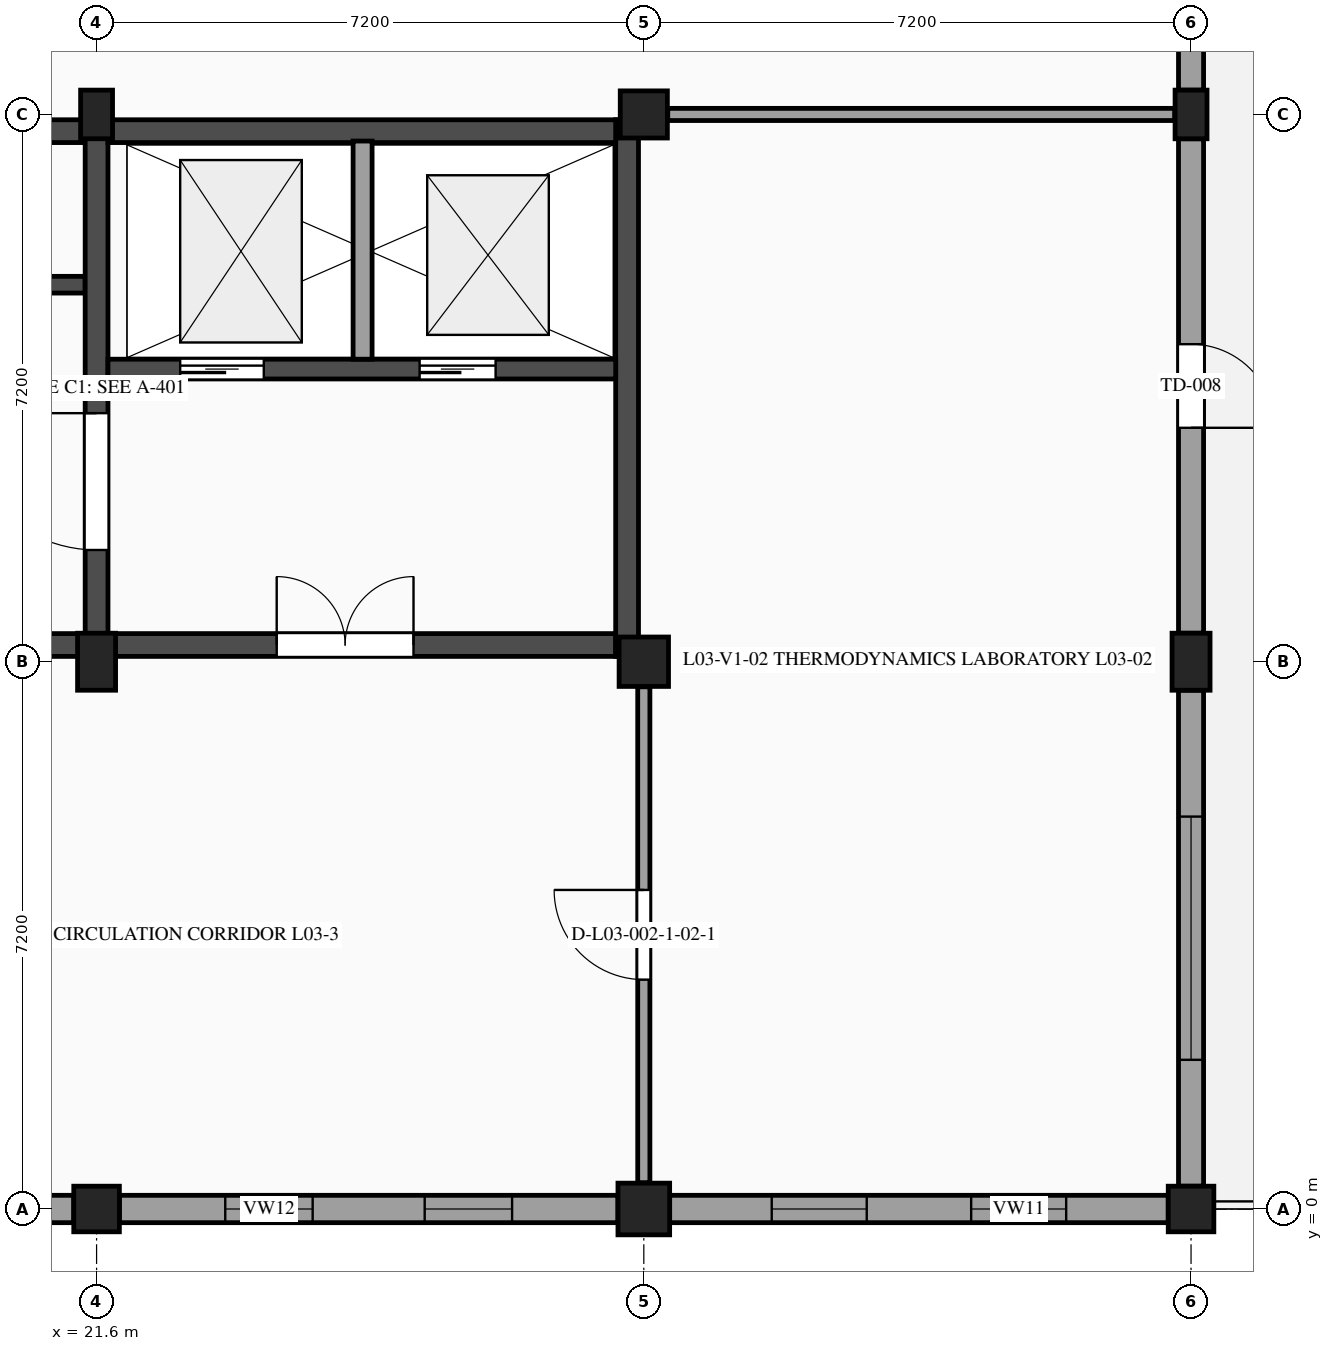
"""IFC4 building model, lengths in metres.
Left out: names, types, materials, properties, quantities, classifications, styles, units other than length and angle.
Written with IfcOpenShell. Run it as: python <this file> out.ifc"""

import sys

from ifc_helpers import new_model, si_unit, direction, frame, frame_2d, origin, origin_2d, place, context, subcontext, project, spatial, rectangle, extrude, element, fill, save


model = new_model("IFC4")
c1 = context("Model", 3, precision=1e-05, world=origin(), true_north=direction((0.0, 1.0)))
c2 = subcontext(c1, "Body", "Model", "MODEL_VIEW")
j1 = project(units=[si_unit("LENGTHUNIT", "METRE"), si_unit("PLANEANGLEUNIT", "RADIAN")], contexts=[c1])
p1 = place(None, origin())
s1 = spatial("IfcSite", under=j1, at=p1, CompositionType="ELEMENT")
p2 = place(p1, origin())
s2 = spatial("IfcBuilding", under=s1, at=p2, CompositionType="ELEMENT")
p3 = place(p2, frame((0.0, 0.0, 14.4)))
s3 = spatial("IfcBuildingStorey", under=s2, at=p3, CompositionType="ELEMENT", Elevation=14.4)
p4 = place(p3, frame((21.6, 0.0, 0.0), z_axis=(0.0, 0.0, 1.0), x_axis=(1.0, 0.0, 0.0)))
e1 = element("IfcColumn", 1, at=p4, inside=s3, PredefinedType="COLUMN", context=c2, shape_type="SweptSolid", body=[
    extrude(rectangle(XDim=0.6, YDim=0.6, at=origin_2d()), origin(), (0.0, 0.0, 1.0), 4.2),
])
p5 = place(p3, frame((21.6, 7.2, 0.0), z_axis=(0.0, 0.0, 1.0), x_axis=(1.0, 0.0, 0.0)))
e2 = element("IfcColumn", 2, at=p5, inside=s3, PredefinedType="COLUMN", context=c2, shape_type="SweptSolid", body=[
    extrude(rectangle(XDim=0.5, YDim=0.75, at=origin_2d()), origin(), (0.0, 0.0, 1.0), 4.2),
])
p6 = place(p3, frame((21.6, 14.4, 0.0), z_axis=(0.0, 0.0, 1.0), x_axis=(1.0, 0.0, 0.0)))
e3 = element("IfcColumn", 3, at=p6, inside=s3, PredefinedType="PILASTER", context=c2, shape_type="SweptSolid", body=[
    extrude(rectangle(XDim=0.42, YDim=0.64, at=origin_2d()), origin(), (0.0, 0.0, 1.0), 4.2),
])
p7 = place(p3, frame((28.8, 0.0, 0.0), z_axis=(0.0, 0.0, 1.0), x_axis=(1.0, 0.0, 0.0)))
e4 = element("IfcColumn", 4, at=p7, inside=s3, PredefinedType="COLUMN", context=c2, shape_type="SweptSolid", body=[
    extrude(rectangle(XDim=0.68, YDim=0.68, at=origin_2d()), origin(), (0.0, 0.0, 1.0), 4.2),
])
p8 = place(p3, frame((28.8, 7.2, 0.0), z_axis=(0.0, 0.0, 1.0), x_axis=(1.0, 0.0, 0.0)))
e5 = element("IfcColumn", 5, at=p8, inside=s3, PredefinedType="COLUMN", context=c2, shape_type="SweptSolid", body=[
    extrude(rectangle(XDim=0.65, YDim=0.65, at=origin_2d()), origin(), (0.0, 0.0, 1.0), 4.2),
])
p9 = place(p3, frame((28.8, 14.4, 0.0), z_axis=(0.0, 0.0, 1.0), x_axis=(1.0, 0.0, 0.0)))
e6 = element("IfcColumn", 6, at=p9, inside=s3, PredefinedType="COLUMN", context=c2, shape_type="SweptSolid", body=[
    extrude(rectangle(XDim=0.62, YDim=0.62, at=origin_2d()), origin(), (0.0, 0.0, 1.0), 4.2),
])
p10 = place(p3, frame((36.0, 0.0, 0.0), z_axis=(0.0, 0.0, 1.0), x_axis=(1.0, 0.0, 0.0)))
e7 = element("IfcColumn", 7, at=p10, inside=s3, PredefinedType="COLUMN", context=c2, shape_type="SweptSolid", body=[
    extrude(rectangle(XDim=0.6, YDim=0.6, at=origin_2d()), origin(), (0.0, 0.0, 1.0), 4.2),
])
p11 = place(p3, frame((36.0, 7.2, 0.0), z_axis=(0.0, 0.0, 1.0), x_axis=(1.0, 0.0, 0.0)))
e8 = element("IfcColumn", 8, at=p11, inside=s3, PredefinedType="COLUMN", context=c2, shape_type="SweptSolid", body=[
    extrude(rectangle(XDim=0.5, YDim=0.75, at=origin_2d()), origin(), (0.0, 0.0, 1.0), 4.2),
])
p12 = place(p3, frame((36.0, 14.4, 0.0), z_axis=(0.0, 0.0, 1.0), x_axis=(1.0, 0.0, 0.0)))
e9 = element("IfcColumn", 9, at=p12, inside=s3, PredefinedType="PILASTER", context=c2, shape_type="SweptSolid", body=[
    extrude(rectangle(XDim=0.42, YDim=0.64, at=origin_2d()), origin(), (0.0, 0.0, 1.0), 4.2),
])
p13 = place(p3, frame((36.0, 21.26, 0.0), z_axis=(0.0, 0.0, 1.0), x_axis=(0.0, -1.0, 0.0)))
e10 = element("IfcWall", 10, at=p13, inside=s3, PredefinedType="STANDARD", context=c2, shape_type="SweptSolid", body=[
    extrude(rectangle(XDim=6.54, YDim=0.33, at=frame_2d((3.27, 0.0))), origin(), (0.0, 0.0, 1.0), 3.135),
])
p14 = place(p13, frame((2.57, 0.0, 0.0)))
e11 = element("IfcOpeningElement", 11, at=p14, cuts=e10, PredefinedType="OPENING", context=c2, shape_type="SweptSolid", body=[
    extrude(rectangle(XDim=1.4, YDim=2.25, at=frame_2d((0.7, 1.125))), frame((0.0, 0.175, 0.0), z_axis=(0.0, -1.0, 0.0), x_axis=(1.0, 0.0, 0.0)), (0.0, 0.0, 1.0), 0.35),
])
p15 = place(p3, frame((36.0, 14.08, 0.0), z_axis=(0.0, 0.0, 1.0), x_axis=(0.0, -1.0, 0.0)))
e12 = element("IfcWall", 12, at=p15, inside=s3, PredefinedType="STANDARD", context=c2, shape_type="SweptSolid", body=[
    extrude(rectangle(XDim=6.505, YDim=0.33, at=frame_2d((3.252, 0.0))), origin(), (0.0, 0.0, 1.0), 3.135),
])
p16 = place(p15, frame((2.702, 0.0, 0.0)))
e13 = element("IfcOpeningElement", 13, at=p16, cuts=e12, PredefinedType="OPENING", context=c2, shape_type="SweptSolid", body=[
    extrude(rectangle(XDim=1.1, YDim=2.2, at=frame_2d((0.55, 1.1))), frame((0.0, 0.175, 0.0), z_axis=(0.0, -1.0, 0.0), x_axis=(1.0, 0.0, 0.0)), (0.0, 0.0, 1.0), 0.35),
])
p17 = place(p3, frame((36.0, 6.825, 0.0), z_axis=(0.0, 0.0, 1.0), x_axis=(0.0, -1.0, 0.0)))
e14 = element("IfcWall", 14, at=p17, inside=s3, PredefinedType="STANDARD", context=c2, shape_type="SweptSolid", body=[
    extrude(rectangle(XDim=6.525, YDim=0.33, at=frame_2d((3.262, 0.0))), origin(), (0.0, 0.0, 1.0), 3.135),
])
p18 = place(p17, frame((1.663, 0.0, 0.95)))
e15 = element("IfcOpeningElement", 15, at=p18, cuts=e14, PredefinedType="OPENING", context=c2, shape_type="SweptSolid", body=[
    extrude(rectangle(XDim=3.2, YDim=1.45, at=frame_2d((1.6, 0.725))), frame((0.0, 0.175, 0.0), z_axis=(0.0, -1.0, 0.0), x_axis=(1.0, 0.0, 0.0)), (0.0, 0.0, 1.0), 0.35),
])
p19 = place(p3, frame((35.7, 0.0, 0.0), z_axis=(0.0, 0.0, 1.0), x_axis=(-1.0, 0.0, 0.0)))
e16 = element("IfcWall", 16, at=p19, inside=s3, PredefinedType="STANDARD", context=c2, shape_type="SweptSolid", body=[
    extrude(rectangle(XDim=6.56, YDim=0.36, at=frame_2d((3.28, 0.0))), origin(), (0.0, 0.0, 1.0), 3.185),
])
p20 = place(p19, frame((1.343, 0.0, 1.15)))
e17 = element("IfcOpeningElement", 17, at=p20, cuts=e16, PredefinedType="OPENING", context=c2, shape_type="SweptSolid", body=[
    extrude(rectangle(XDim=1.25, YDim=1.25, at=frame_2d((0.625, 0.625))), frame((0.0, 0.19, 0.0), z_axis=(0.0, -1.0, 0.0), x_axis=(1.0, 0.0, 0.0)), (0.0, 0.0, 1.0), 0.38),
])
p21 = place(p19, frame((3.967, 0.0, 1.15)))
e18 = element("IfcOpeningElement", 18, at=p21, cuts=e16, PredefinedType="OPENING", context=c2, shape_type="SweptSolid", body=[
    extrude(rectangle(XDim=1.25, YDim=1.25, at=frame_2d((0.625, 0.625))), frame((0.0, 0.19, 0.0), z_axis=(0.0, -1.0, 0.0), x_axis=(1.0, 0.0, 0.0)), (0.0, 0.0, 1.0), 0.38),
])
p22 = place(p3, frame((28.46, 0.0, 0.0), z_axis=(0.0, 0.0, 1.0), x_axis=(-1.0, 0.0, 0.0)))
e19 = element("IfcWall", 19, at=p22, inside=s3, PredefinedType="STANDARD", context=c2, shape_type="SweptSolid", body=[
    extrude(rectangle(XDim=6.56, YDim=0.36, at=frame_2d((3.28, 0.0))), origin(), (0.0, 0.0, 1.0), 3.185),
])
p23 = place(p22, frame((1.393, 0.0, 1.15)))
e20 = element("IfcOpeningElement", 20, at=p23, cuts=e19, PredefinedType="OPENING", context=c2, shape_type="SweptSolid", body=[
    extrude(rectangle(XDim=1.15, YDim=1.2, at=frame_2d((0.575, 0.6))), frame((0.0, 0.19, 0.0), z_axis=(0.0, -1.0, 0.0), x_axis=(1.0, 0.0, 0.0)), (0.0, 0.0, 1.0), 0.38),
])
p24 = place(p22, frame((4.017, 0.0, 1.15)))
e21 = element("IfcOpeningElement", 21, at=p24, cuts=e19, PredefinedType="OPENING", context=c2, shape_type="SweptSolid", body=[
    extrude(rectangle(XDim=1.15, YDim=1.2, at=frame_2d((0.575, 0.6))), frame((0.0, 0.19, 0.0), z_axis=(0.0, -1.0, 0.0), x_axis=(1.0, 0.0, 0.0)), (0.0, 0.0, 1.0), 0.38),
])
p25 = place(p3, frame((21.3, 0.0, 0.0), z_axis=(0.0, 0.0, 1.0), x_axis=(-1.0, 0.0, 0.0)))
e22 = element("IfcWall", 22, at=p25, inside=s3, PredefinedType="STANDARD", context=c2, shape_type="SweptSolid", body=[
    extrude(rectangle(XDim=6.56, YDim=0.36, at=frame_2d((3.28, 0.0))), origin(), (0.0, 0.0, 1.0), 3.185),
])
p26 = place(p25, frame((1.468, 0.0, 1.15)))
e23 = element("IfcOpeningElement", 23, at=p26, cuts=e22, PredefinedType="OPENING", context=c2, shape_type="SweptSolid", body=[
    extrude(rectangle(XDim=1.0, YDim=1.2, at=frame_2d((0.5, 0.6))), frame((0.0, 0.19, 0.0), z_axis=(0.0, -1.0, 0.0), x_axis=(1.0, 0.0, 0.0)), (0.0, 0.0, 1.0), 0.38),
])
p27 = place(p25, frame((4.092, 0.0, 1.15)))
e24 = element("IfcOpeningElement", 24, at=p27, cuts=e22, PredefinedType="OPENING", context=c2, shape_type="SweptSolid", body=[
    extrude(rectangle(XDim=1.0, YDim=1.2, at=frame_2d((0.5, 0.6))), frame((0.0, 0.19, 0.0), z_axis=(0.0, -1.0, 0.0), x_axis=(1.0, 0.0, 0.0)), (0.0, 0.0, 1.0), 0.38),
])
p28 = place(p3, frame((14.77, 7.42, 0.0), z_axis=(0.0, 0.0, 1.0), x_axis=(1.0, 0.0, 0.0)))
e25 = element("IfcWall", 25, at=p28, inside=s3, PredefinedType="SHEAR", context=c2, shape_type="SweptSolid", body=[
    extrude(rectangle(XDim=6.68, YDim=0.3, at=frame_2d((3.34, 0.0))), origin(), (0.0, 0.0, 1.0), 3.94),
])
p29 = place(p3, frame((14.77, 14.18, 0.0), z_axis=(0.0, 0.0, 1.0), x_axis=(1.0, 0.0, 0.0)))
e26 = element("IfcWall", 26, at=p29, inside=s3, PredefinedType="SHEAR", context=c2, shape_type="SweptSolid", body=[
    extrude(rectangle(XDim=6.68, YDim=0.3, at=frame_2d((3.34, 0.0))), origin(), (0.0, 0.0, 1.0), 3.94),
])
p30 = place(p29, frame((1.42, 0.0, 0.0)))
e27 = element("IfcOpeningElement", 27, at=p30, cuts=e26, PredefinedType="OPENING", context=c2, shape_type="SweptSolid", body=[
    extrude(rectangle(XDim=0.85, YDim=2.1, at=frame_2d((0.425, 1.05))), frame((0.0, 0.16, 0.0), z_axis=(0.0, -1.0, 0.0), x_axis=(1.0, 0.0, 0.0)), (0.0, 0.0, 1.0), 0.32),
])
p31 = place(p29, frame((3.4, 0.0, 0.0)))
e28 = element("IfcOpeningElement", 28, at=p31, cuts=e26, PredefinedType="OPENING", context=c2, shape_type="SweptSolid", body=[
    extrude(rectangle(XDim=0.95, YDim=2.15, at=frame_2d((0.475, 1.075))), frame((0.0, 0.16, 0.0), z_axis=(0.0, -1.0, 0.0), x_axis=(1.0, 0.0, 0.0)), (0.0, 0.0, 1.0), 0.32),
])
p32 = place(p3, frame((14.77, 12.16, 0.0), z_axis=(0.0, 0.0, 1.0), x_axis=(1.0, 0.0, 0.0)))
e29 = element("IfcWall", 29, at=p32, inside=s3, PredefinedType="SHEAR", context=c2, shape_type="SweptSolid", body=[
    extrude(rectangle(XDim=6.68, YDim=0.22, at=frame_2d((3.34, 0.0))), origin(), (0.0, 0.0, 1.0), 3.94),
])
p33 = place(p3, frame((21.6, 7.27, 0.0), z_axis=(0.0, 0.0, 1.0), x_axis=(0.0, 1.0, 0.0)))
e30 = element("IfcWall", 30, at=p33, inside=s3, PredefinedType="SHEAR", context=c2, shape_type="SweptSolid", body=[
    extrude(rectangle(XDim=7.06, YDim=0.3, at=frame_2d((3.53, 0.0))), origin(), (0.0, 0.0, 1.0), 3.94),
])
p34 = place(p33, frame((1.4, 0.0, 0.0)))
e31 = element("IfcOpeningElement", 31, at=p34, cuts=e30, PredefinedType="OPENING", context=c2, shape_type="SweptSolid", body=[
    extrude(rectangle(XDim=1.8, YDim=2.2, at=frame_2d((0.9, 1.1))), frame((0.0, 0.16, 0.0), z_axis=(0.0, -1.0, 0.0), x_axis=(1.0, 0.0, 0.0)), (0.0, 0.0, 1.0), 0.32),
])
p35 = place(p3, frame((21.75, 7.42, 0.0), z_axis=(0.0, 0.0, 1.0), x_axis=(1.0, 0.0, 0.0)))
e32 = element("IfcWall", 32, at=p35, inside=s3, PredefinedType="SHEAR", context=c2, shape_type="SweptSolid", body=[
    extrude(rectangle(XDim=6.68, YDim=0.3, at=frame_2d((3.34, 0.0))), origin(), (0.0, 0.0, 1.0), 3.94),
])
p36 = place(p35, frame((2.22, 0.0, 0.0)))
e33 = element("IfcOpeningElement", 33, at=p36, cuts=e32, PredefinedType="OPENING", context=c2, shape_type="SweptSolid", body=[
    extrude(rectangle(XDim=1.8, YDim=2.2, at=frame_2d((0.9, 1.1))), frame((0.0, 0.16, 0.0), z_axis=(0.0, -1.0, 0.0), x_axis=(1.0, 0.0, 0.0)), (0.0, 0.0, 1.0), 0.32),
])
p37 = place(p3, frame((28.58, 7.27, 0.0), z_axis=(0.0, 0.0, 1.0), x_axis=(0.0, 1.0, 0.0)))
e34 = element("IfcWall", 34, at=p37, inside=s3, PredefinedType="SHEAR", context=c2, shape_type="SweptSolid", body=[
    extrude(rectangle(XDim=7.06, YDim=0.3, at=frame_2d((3.53, 0.0))), origin(), (0.0, 0.0, 1.0), 3.94),
])
p38 = place(p3, frame((21.75, 14.18, 0.0), z_axis=(0.0, 0.0, 1.0), x_axis=(1.0, 0.0, 0.0)))
e35 = element("IfcWall", 35, at=p38, inside=s3, PredefinedType="SHEAR", context=c2, shape_type="SweptSolid", body=[
    extrude(rectangle(XDim=6.68, YDim=0.3, at=frame_2d((3.34, 0.0))), origin(), (0.0, 0.0, 1.0), 3.94),
])
p39 = place(p3, frame((21.75, 11.05, 0.0), z_axis=(0.0, 0.0, 1.0), x_axis=(1.0, 0.0, 0.0)))
e36 = element("IfcWall", 36, at=p39, inside=s3, PredefinedType="SHEAR", context=c2, shape_type="SweptSolid", body=[
    extrude(rectangle(XDim=6.68, YDim=0.26, at=frame_2d((3.34, 0.0))), origin(), (0.0, 0.0, 1.0), 3.94),
])
p40 = place(p39, frame((0.95, 0.0, 0.0)))
e37 = element("IfcOpeningElement", 37, at=p40, cuts=e36, PredefinedType="OPENING", context=c2, shape_type="SweptSolid", body=[
    extrude(rectangle(XDim=1.1, YDim=2.2, at=frame_2d((0.55, 1.1))), frame((0.0, 0.14, 0.0), z_axis=(0.0, -1.0, 0.0), x_axis=(1.0, 0.0, 0.0)), (0.0, 0.0, 1.0), 0.28),
])
p41 = place(p39, frame((4.1, 0.0, 0.0)))
e38 = element("IfcOpeningElement", 38, at=p41, cuts=e36, PredefinedType="OPENING", context=c2, shape_type="SweptSolid", body=[
    extrude(rectangle(XDim=1.0, YDim=2.15, at=frame_2d((0.5, 1.075))), frame((0.0, 0.14, 0.0), z_axis=(0.0, -1.0, 0.0), x_axis=(1.0, 0.0, 0.0)), (0.0, 0.0, 1.0), 0.28),
])
p42 = place(p3, frame((25.1, 11.18, 0.0), z_axis=(0.0, 0.0, 1.0), x_axis=(0.0, 1.0, 0.0)))
e39 = element("IfcWall", 39, at=p42, inside=s3, PredefinedType="PARTITIONING", context=c2, shape_type="SweptSolid", body=[
    extrude(rectangle(XDim=2.87, YDim=0.25, at=frame_2d((1.435, 0.0))), origin(), (0.0, 0.0, 1.0), 3.94),
])
p43 = place(p3, frame((28.8, 0.345, 0.0), z_axis=(0.0, 0.0, 1.0), x_axis=(0.0, 1.0, 0.0)))
e40 = element("IfcWall", 40, at=p43, inside=s3, PredefinedType="PARTITIONING", context=c2, shape_type="SweptSolid", body=[
    extrude(rectangle(XDim=6.525, YDim=0.16, at=frame_2d((3.263, 0.0))), origin(), (0.0, 0.0, 1.0), 3.25),
])
p44 = place(p43, frame((2.673, 0.0, 0.0)))
e41 = element("IfcOpeningElement", 41, at=p44, cuts=e40, PredefinedType="OPENING", context=c2, shape_type="SweptSolid", body=[
    extrude(rectangle(XDim=1.18, YDim=2.18, at=frame_2d((0.59, 1.09))), frame((0.0, 0.09, 0.0), z_axis=(0.0, -1.0, 0.0), x_axis=(1.0, 0.0, 0.0)), (0.0, 0.0, 1.0), 0.18),
])
p45 = place(p3, frame((29.115, 14.4, 0.0), z_axis=(0.0, 0.0, 1.0), x_axis=(1.0, 0.0, 0.0)))
e42 = element("IfcWall", 42, at=p45, inside=s3, PredefinedType="PARTITIONING", context=c2, shape_type="SweptSolid", body=[
    extrude(rectangle(XDim=6.67, YDim=0.16, at=frame_2d((3.335, 0.0))), origin(), (0.0, 0.0, 1.0), 3.29),
])
p46 = place(p16, origin())
e43 = element("IfcDoor", 43, at=p46, inside=s3, OperationType="SINGLE_SWING_RIGHT", PredefinedType="DOOR", context=c2, shape_type="SweptSolid", body=[
    extrude(rectangle(XDim=1.1, YDim=2.2, at=frame_2d((0.55, 1.1))), frame((0.0, 0.025, 0.0), z_axis=(0.0, -1.0, 0.0), x_axis=(1.0, 0.0, 0.0)), (0.0, 0.0, 1.0), 0.05),
])
fill(e13, e43)
p47 = place(p18, origin())
e44 = element("IfcWindow", 44, at=p47, inside=s3, PartitioningType="SINGLE_PANEL", PredefinedType="WINDOW", context=c2, shape_type="SweptSolid", body=[
    extrude(rectangle(XDim=3.2, YDim=1.45, at=frame_2d((1.6, 0.725))), frame((0.0, 0.03, 0.0), z_axis=(0.0, -1.0, 0.0), x_axis=(1.0, 0.0, 0.0)), (0.0, 0.0, 1.0), 0.06),
])
fill(e15, e44)
p48 = place(p20, origin())
e45 = element("IfcWindow", 45, at=p48, inside=s3, PartitioningType="SINGLE_PANEL", PredefinedType="WINDOW", context=c2, shape_type="SweptSolid", body=[
    extrude(rectangle(XDim=1.25, YDim=1.25, at=frame_2d((0.625, 0.625))), frame((0.0, -0.08, 0.0), z_axis=(0.0, -1.0, 0.0), x_axis=(1.0, 0.0, 0.0)), (0.0, 0.0, 1.0), 0.06),
])
fill(e17, e45)
p49 = place(p21, origin())
e46 = element("IfcWindow", 46, at=p49, inside=s3, PartitioningType="SINGLE_PANEL", PredefinedType="WINDOW", context=c2, shape_type="SweptSolid", body=[
    extrude(rectangle(XDim=1.25, YDim=1.25, at=frame_2d((0.625, 0.625))), frame((0.0, -0.08, 0.0), z_axis=(0.0, -1.0, 0.0), x_axis=(1.0, 0.0, 0.0)), (0.0, 0.0, 1.0), 0.06),
])
fill(e18, e46)
p50 = place(p23, origin())
e47 = element("IfcWindow", 47, at=p50, inside=s3, PartitioningType="SINGLE_PANEL", PredefinedType="WINDOW", context=c2, shape_type="SweptSolid", body=[
    extrude(rectangle(XDim=1.15, YDim=1.2, at=frame_2d((0.575, 0.6))), frame((0.0, -0.08, 0.0), z_axis=(0.0, -1.0, 0.0), x_axis=(1.0, 0.0, 0.0)), (0.0, 0.0, 1.0), 0.06),
])
fill(e20, e47)
p51 = place(p24, origin())
e48 = element("IfcWindow", 48, at=p51, inside=s3, PartitioningType="SINGLE_PANEL", PredefinedType="WINDOW", context=c2, shape_type="SweptSolid", body=[
    extrude(rectangle(XDim=1.15, YDim=1.2, at=frame_2d((0.575, 0.6))), frame((0.0, -0.08, 0.0), z_axis=(0.0, -1.0, 0.0), x_axis=(1.0, 0.0, 0.0)), (0.0, 0.0, 1.0), 0.06),
])
fill(e21, e48)
p52 = place(p34, origin())
e49 = element("IfcDoor", 49, at=p52, inside=s3, OperationType="SINGLE_SWING_RIGHT", PredefinedType="DOOR", context=c2, shape_type="SweptSolid", body=[
    extrude(rectangle(XDim=1.8, YDim=2.2, at=frame_2d((0.9, 1.1))), frame((0.0, 0.025, 0.0), z_axis=(0.0, -1.0, 0.0), x_axis=(1.0, 0.0, 0.0)), (0.0, 0.0, 1.0), 0.05),
])
fill(e31, e49)
p53 = place(p40, origin())
e50 = element("IfcDoor", 50, at=p53, inside=s3, OperationType="SLIDING_TO_LEFT", PredefinedType="DOOR", context=c2, shape_type="SweptSolid", body=[
    extrude(rectangle(XDim=1.1, YDim=2.2, at=frame_2d((0.55, 1.1))), frame((0.0, 0.025, 0.0), z_axis=(0.0, -1.0, 0.0), x_axis=(1.0, 0.0, 0.0)), (0.0, 0.0, 1.0), 0.05),
])
fill(e37, e50)
p54 = place(p41, origin())
e51 = element("IfcDoor", 51, at=p54, inside=s3, OperationType="SLIDING_TO_RIGHT", PredefinedType="DOOR", context=c2, shape_type="SweptSolid", body=[
    extrude(rectangle(XDim=1.0, YDim=2.15, at=frame_2d((0.5, 1.075))), frame((0.0, 0.025, 0.0), z_axis=(0.0, -1.0, 0.0), x_axis=(1.0, 0.0, 0.0)), (0.0, 0.0, 1.0), 0.05),
])
fill(e38, e51)
p55 = place(p36, origin())
e52 = element("IfcDoor", 52, at=p55, inside=s3, OperationType="DOUBLE_DOOR_SINGLE_SWING", PredefinedType="DOOR", context=c2, shape_type="SweptSolid", body=[
    extrude(rectangle(XDim=1.8, YDim=2.2, at=frame_2d((0.9, 1.1))), frame((0.0, 0.025, 0.0), z_axis=(0.0, -1.0, 0.0), x_axis=(1.0, 0.0, 0.0)), (0.0, 0.0, 1.0), 0.05),
])
fill(e33, e52)
p56 = place(p44, origin())
e53 = element("IfcDoor", 53, at=p56, inside=s3, OperationType="SINGLE_SWING_RIGHT", PredefinedType="DOOR", context=c2, shape_type="SweptSolid", body=[
    extrude(rectangle(XDim=1.18, YDim=2.18, at=frame_2d((0.59, 1.09))), frame((0.0, 0.025, 0.0), z_axis=(0.0, -1.0, 0.0), x_axis=(1.0, 0.0, 0.0)), (0.0, 0.0, 1.0), 0.05),
])
fill(e41, e53)
save(model, sys.argv[1])
